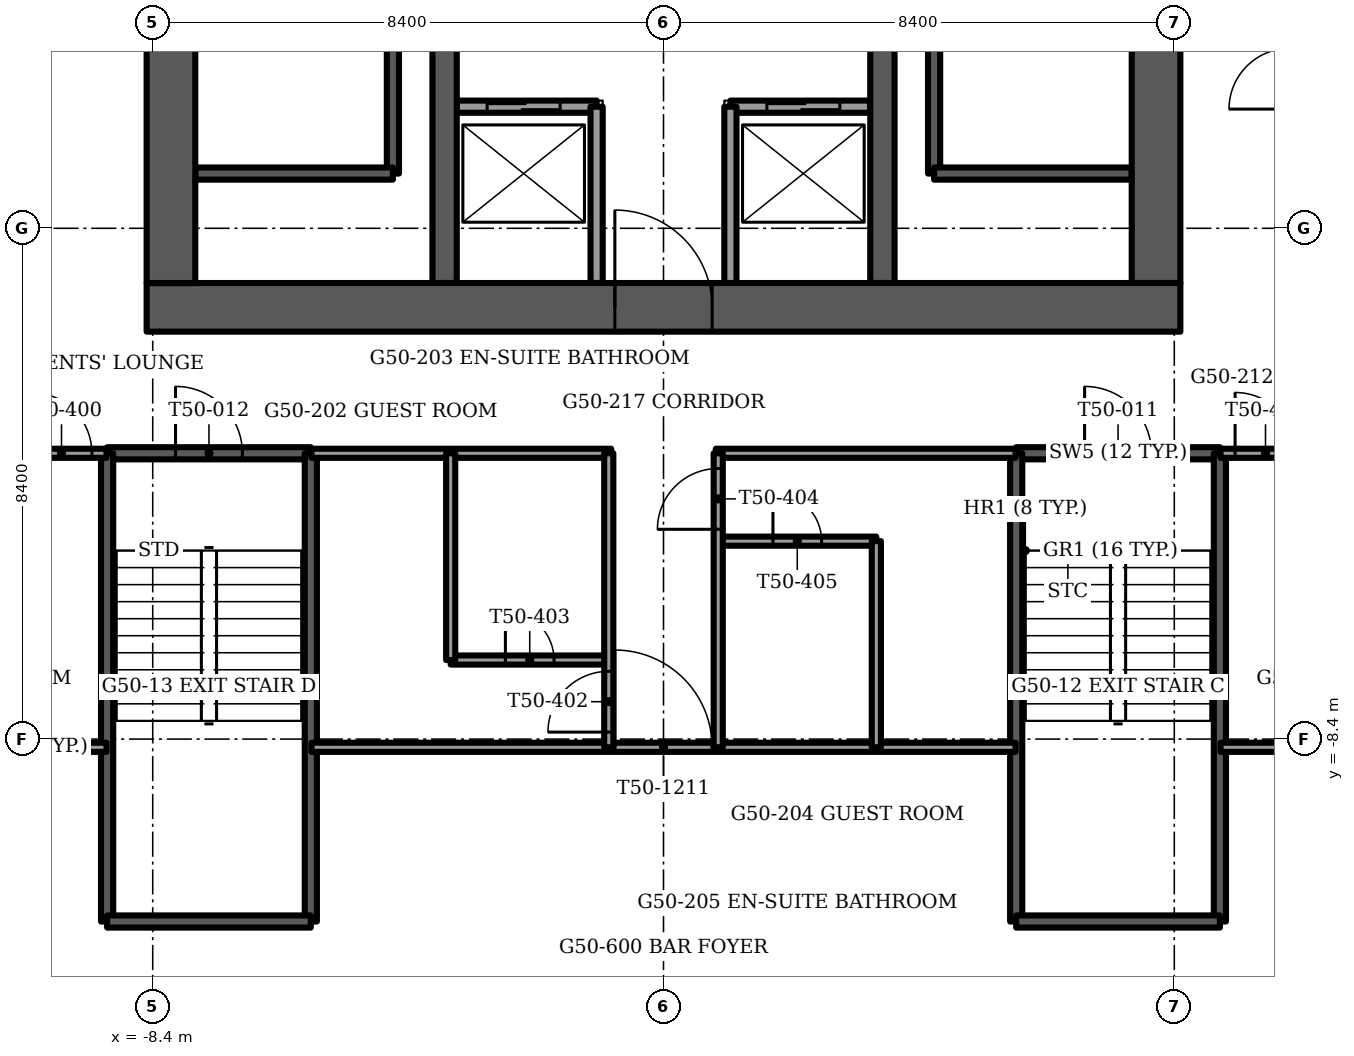
"""IFC4 building model, lengths in metres.
Left out: names, types, materials, properties, quantities, classifications, styles, units other than length and angle.
Written with IfcOpenShell. Run it as: python <this file> out.ifc"""

import sys

from ifc_helpers import new_model, si_unit, direction, frame, frame_2d, origin, place, context, subcontext, project, spatial, rectangle, extrude, element, fill, save


model = new_model("IFC4")
c1 = context("Model", 3, precision=1e-05, world=origin(), true_north=direction((0.0, 1.0)))
c2 = subcontext(c1, "Body", "Model", "MODEL_VIEW")
j1 = project(units=[si_unit("LENGTHUNIT", "METRE"), si_unit("PLANEANGLEUNIT", "RADIAN")], contexts=[c1])
p1 = place(None, origin())
s1 = spatial("IfcSite", under=j1, at=p1, CompositionType="ELEMENT")
p2 = place(p1, origin())
s2 = spatial("IfcBuilding", under=s1, at=p2, CompositionType="ELEMENT")
p3 = place(p2, frame((0.0, 0.0, 202.0)))
s3 = spatial("IfcBuildingStorey", under=s2, at=p3, CompositionType="ELEMENT", Elevation=202.0)
p4 = place(p3, frame((-8.5, -1.3, -0.3), z_axis=(0.0, 0.0, 1.0), x_axis=(1.0, 0.0, 0.0)))
e1 = element("IfcWall", 1, at=p4, inside=s3, PredefinedType="SHEAR", context=c2, shape_type="SweptSolid", body=[
    extrude(rectangle(XDim=17.0, YDim=0.8, at=frame_2d((8.5, 0.0))), origin(), (0.0, 0.0, 1.0), 3.75),
])
p5 = place(p4, frame((7.7, 0.0, 0.0)))
e2 = element("IfcOpeningElement", 2, at=p5, cuts=e1, PredefinedType="OPENING", context=c2, shape_type="SweptSolid", body=[
    extrude(rectangle(XDim=1.6, YDim=2.1, at=frame_2d((0.8, 1.05))), frame((0.0, 0.4, 0.0), z_axis=(0.0, -1.0, 0.0), x_axis=(1.0, 0.0, 0.0)), (0.0, 0.0, 1.0), 0.8),
])
p6 = place(p3, frame((-8.1, -0.9, -0.3), z_axis=(0.0, 0.0, 1.0), x_axis=(0.0, 1.0, 0.0)))
e3 = element("IfcWall", 3, at=p6, inside=s3, PredefinedType="SHEAR", context=c2, shape_type="SweptSolid", body=[
    extrude(rectangle(XDim=9.8, YDim=0.8, at=frame_2d((4.9, 0.0))), origin(), (0.0, 0.0, 1.0), 3.75),
])
p7 = place(p6, frame((8.15, 0.0, 0.0)))
e4 = element("IfcOpeningElement", 4, at=p7, cuts=e3, PredefinedType="OPENING", context=c2, shape_type="SweptSolid", body=[
    extrude(rectangle(XDim=1.1, YDim=2.1, at=frame_2d((0.55, 1.05))), frame((0.0, 0.4, 0.0), z_axis=(0.0, -1.0, 0.0), x_axis=(1.0, 0.0, 0.0)), (0.0, 0.0, 1.0), 0.8),
])
p8 = place(p3, frame((8.1, -0.9, -0.3), z_axis=(0.0, 0.0, 1.0), x_axis=(0.0, 1.0, 0.0)))
e5 = element("IfcWall", 5, at=p8, inside=s3, PredefinedType="SHEAR", context=c2, shape_type="SweptSolid", body=[
    extrude(rectangle(XDim=9.8, YDim=0.8, at=frame_2d((4.9, 0.0))), origin(), (0.0, 0.0, 1.0), 3.75),
])
p9 = place(p8, frame((8.15, 0.0, 0.0)))
e6 = element("IfcOpeningElement", 6, at=p9, cuts=e5, PredefinedType="OPENING", context=c2, shape_type="SweptSolid", body=[
    extrude(rectangle(XDim=1.1, YDim=2.1, at=frame_2d((0.55, 1.05))), frame((0.0, 0.4, 0.0), z_axis=(0.0, -1.0, 0.0), x_axis=(1.0, 0.0, 0.0)), (0.0, 0.0, 1.0), 0.8),
])
for number, where, z_axis, x_axis in (
    (7, (-3.6, -0.9, -0.3), (0.0, 0.0, 1.0), (0.0, 1.0, 0.0)),
    (8, (3.6, -0.9, -0.3), (0.0, 0.0, 1.0), (0.0, 1.0, 0.0)),
):
    element("IfcWall", number, at=place(p3, frame(where, z_axis=z_axis, x_axis=x_axis)), inside=s3, PredefinedType="SHEAR", context=c2, shape_type="SweptSolid", body=[
        extrude(rectangle(XDim=9.8, YDim=0.4, at=frame_2d((4.9, 0.0))), origin(), (0.0, 0.0, 1.0), 3.75),
    ])
p10 = place(p3, frame((-3.4, 2.0, 0.0), z_axis=(0.0, 0.0, 1.0), x_axis=(1.0, 0.0, 0.0)))
e9 = element("IfcWall", 9, at=p10, inside=s3, PredefinedType="PARTITIONING", context=c2, shape_type="SweptSolid", body=[
    extrude(rectangle(XDim=2.3, YDim=0.2, at=frame_2d((1.15, 0.0))), origin(), (0.0, 0.0, 1.0), 3.45),
])
p11 = place(p10, frame((0.5, 0.0, 0.0)))
e10 = element("IfcOpeningElement", 10, at=p11, cuts=e9, PredefinedType="OPENING", context=c2, shape_type="SweptSolid", body=[
    extrude(rectangle(XDim=1.2, YDim=2.1, at=frame_2d((0.6, 1.05))), frame((0.0, 0.1, 0.0), z_axis=(0.0, -1.0, 0.0), x_axis=(1.0, 0.0, 0.0)), (0.0, 0.0, 1.0), 0.2),
])
p12 = place(p3, frame((1.1, 2.0, 0.0), z_axis=(0.0, 0.0, 1.0), x_axis=(1.0, 0.0, 0.0)))
e11 = element("IfcWall", 11, at=p12, inside=s3, PredefinedType="PARTITIONING", context=c2, shape_type="SweptSolid", body=[
    extrude(rectangle(XDim=2.3, YDim=0.2, at=frame_2d((1.15, 0.0))), origin(), (0.0, 0.0, 1.0), 3.45),
])
p13 = place(p12, frame((0.6, 0.0, 0.0)))
e12 = element("IfcOpeningElement", 12, at=p13, cuts=e11, PredefinedType="OPENING", context=c2, shape_type="SweptSolid", body=[
    extrude(rectangle(XDim=1.2, YDim=2.1, at=frame_2d((0.6, 1.05))), frame((0.0, 0.1, 0.0), z_axis=(0.0, -1.0, 0.0), x_axis=(1.0, 0.0, 0.0)), (0.0, 0.0, 1.0), 0.2),
])
for number, where, z_axis, x_axis in (
    (13, (-1.1, -0.9, 0.0), (0.0, 0.0, 1.0), (0.0, 1.0, 0.0)),
    (14, (1.1, -0.9, 0.0), (0.0, 0.0, 1.0), (0.0, 1.0, 0.0)),
):
    element("IfcWall", number, at=place(p3, frame(where, z_axis=z_axis, x_axis=x_axis)), inside=s3, PredefinedType="PARTITIONING", context=c2, shape_type="SweptSolid", body=[
        extrude(rectangle(XDim=2.9, YDim=0.2, at=frame_2d((1.45, 0.0))), origin(), (0.0, 0.0, 1.0), 3.45),
    ])
p14 = place(p3, frame((-4.45, 0.9, -0.3), z_axis=(0.0, 0.0, 1.0), x_axis=(0.0, 1.0, 0.0)))
e15 = element("IfcWall", 15, at=p14, inside=s3, PredefinedType="SOLIDWALL", context=c2, shape_type="SweptSolid", body=[
    extrude(rectangle(XDim=8.0, YDim=0.2, at=frame_2d((4.0, 0.0))), origin(), (0.0, 0.0, 1.0), 3.75),
])
p15 = place(p3, frame((-7.7, 0.9, -0.3), z_axis=(0.0, 0.0, 1.0), x_axis=(1.0, 0.0, 0.0)))
e16 = element("IfcWall", 16, at=p15, inside=s3, PredefinedType="SOLIDWALL", context=c2, shape_type="SweptSolid", body=[
    extrude(rectangle(XDim=3.25, YDim=0.2, at=frame_2d((1.625, 0.0))), origin(), (0.0, 0.0, 1.0), 3.75),
])
p16 = place(p3, frame((4.45, 0.9, -0.3), z_axis=(0.0, 0.0, 1.0), x_axis=(0.0, 1.0, 0.0)))
e17 = element("IfcWall", 17, at=p16, inside=s3, PredefinedType="SOLIDWALL", context=c2, shape_type="SweptSolid", body=[
    extrude(rectangle(XDim=8.0, YDim=0.2, at=frame_2d((4.0, 0.0))), origin(), (0.0, 0.0, 1.0), 3.75),
])
p17 = place(p3, frame((4.45, 0.9, -0.3), z_axis=(0.0, 0.0, 1.0), x_axis=(1.0, 0.0, 0.0)))
e18 = element("IfcWall", 18, at=p17, inside=s3, PredefinedType="SOLIDWALL", context=c2, shape_type="SweptSolid", body=[
    extrude(rectangle(XDim=3.25, YDim=0.2, at=frame_2d((1.625, 0.0))), origin(), (0.0, 0.0, 1.0), 3.75),
])
p18 = place(p3, frame((5.8, -3.7, -0.3), z_axis=(0.0, 0.0, 1.0), x_axis=(1.0, 0.0, 0.0)))
e19 = element("IfcWall", 19, at=p18, inside=s3, PredefinedType="SOLIDWALL", context=c2, shape_type="SweptSolid", body=[
    extrude(rectangle(XDim=3.35, YDim=0.2, at=frame_2d((1.675, 0.0))), origin(), (0.0, 0.0, 1.0), 3.75),
])
p19 = place(p18, frame((1.125, 0.0, 0.0)))
e20 = element("IfcOpeningElement", 20, at=p19, cuts=e19, PredefinedType="OPENING", context=c2, shape_type="SweptSolid", body=[
    extrude(rectangle(XDim=1.1, YDim=2.1, at=frame_2d((0.55, 1.05))), frame((0.0, 0.1, 0.0), z_axis=(0.0, -1.0, 0.0), x_axis=(1.0, 0.0, 0.0)), (0.0, 0.0, 1.0), 0.2),
])
for number, where, z_axis, x_axis in (
    (21, (5.8, -3.7, -0.3), (0.0, 0.0, 1.0), (0.0, -1.0, 0.0)),
    (22, (9.15, -3.7, -0.3), (0.0, 0.0, 1.0), (0.0, -1.0, 0.0)),
):
    element("IfcWall", number, at=place(p3, frame(where, z_axis=z_axis, x_axis=x_axis)), inside=s3, PredefinedType="SOLIDWALL", context=c2, shape_type="SweptSolid", body=[
        extrude(rectangle(XDim=7.7, YDim=0.2, at=frame_2d((3.85, 0.0))), origin(), (0.0, 0.0, 1.0), 3.75),
    ])
p20 = place(p3, frame((5.8, -11.4, -0.3), z_axis=(0.0, 0.0, 1.0), x_axis=(1.0, 0.0, 0.0)))
e23 = element("IfcWall", 23, at=p20, inside=s3, PredefinedType="SOLIDWALL", context=c2, shape_type="SweptSolid", body=[
    extrude(rectangle(XDim=3.35, YDim=0.2, at=frame_2d((1.675, 0.0))), origin(), (0.0, 0.0, 1.0), 3.75),
])
p21 = place(p3, frame((-9.15, -3.7, -0.3), z_axis=(0.0, 0.0, 1.0), x_axis=(1.0, 0.0, 0.0)))
e24 = element("IfcWall", 24, at=p21, inside=s3, PredefinedType="SOLIDWALL", context=c2, shape_type="SweptSolid", body=[
    extrude(rectangle(XDim=3.35, YDim=0.2, at=frame_2d((1.675, 0.0))), origin(), (0.0, 0.0, 1.0), 3.75),
])
p22 = place(p21, frame((1.125, 0.0, 0.0)))
e25 = element("IfcOpeningElement", 25, at=p22, cuts=e24, PredefinedType="OPENING", context=c2, shape_type="SweptSolid", body=[
    extrude(rectangle(XDim=1.1, YDim=2.1, at=frame_2d((0.55, 1.05))), frame((0.0, 0.1, 0.0), z_axis=(0.0, -1.0, 0.0), x_axis=(1.0, 0.0, 0.0)), (0.0, 0.0, 1.0), 0.2),
])
for number, where, z_axis, x_axis in (
    (26, (-9.15, -3.7, -0.3), (0.0, 0.0, 1.0), (0.0, -1.0, 0.0)),
    (27, (-5.8, -3.7, -0.3), (0.0, 0.0, 1.0), (0.0, -1.0, 0.0)),
):
    element("IfcWall", number, at=place(p3, frame(where, z_axis=z_axis, x_axis=x_axis)), inside=s3, PredefinedType="SOLIDWALL", context=c2, shape_type="SweptSolid", body=[
        extrude(rectangle(XDim=7.7, YDim=0.2, at=frame_2d((3.85, 0.0))), origin(), (0.0, 0.0, 1.0), 3.75),
    ])
p23 = place(p3, frame((-9.15, -11.4, -0.3), z_axis=(0.0, 0.0, 1.0), x_axis=(1.0, 0.0, 0.0)))
e28 = element("IfcWall", 28, at=p23, inside=s3, PredefinedType="SOLIDWALL", context=c2, shape_type="SweptSolid", body=[
    extrude(rectangle(XDim=3.35, YDim=0.2, at=frame_2d((1.675, 0.0))), origin(), (0.0, 0.0, 1.0), 3.75),
])
p24 = place(p3, frame((-11.93, -8.535, 0.0), z_axis=(0.0, 0.0, 1.0), x_axis=(1.0, 0.0, 0.0)))
e29 = element("IfcWall", 29, at=p24, inside=s3, PredefinedType="PARTITIONING", context=c2, shape_type="SweptSolid", body=[
    extrude(rectangle(XDim=2.77, YDim=0.15, at=frame_2d((1.385, 0.0))), origin(), (0.0, 0.0, 1.0), 3.45),
])
p25 = place(p3, frame((-5.79, -8.535, 0.0), z_axis=(0.0, 0.0, 1.0), x_axis=(1.0, 0.0, 0.0)))
e30 = element("IfcWall", 30, at=p25, inside=s3, PredefinedType="PARTITIONING", context=c2, shape_type="SweptSolid", body=[
    extrude(rectangle(XDim=11.58, YDim=0.15, at=frame_2d((5.79, 0.0))), origin(), (0.0, 0.0, 1.0), 3.45),
])
p26 = place(p25, frame((4.99, 0.0, 0.0)))
e31 = element("IfcOpeningElement", 31, at=p26, cuts=e30, PredefinedType="OPENING", context=c2, shape_type="SweptSolid", body=[
    extrude(rectangle(XDim=1.6, YDim=2.1, at=frame_2d((0.8, 1.05))), frame((0.0, 0.075, 0.0), z_axis=(0.0, -1.0, 0.0), x_axis=(1.0, 0.0, 0.0)), (0.0, 0.0, 1.0), 0.15),
])
p27 = place(p3, frame((9.16, -8.535, 0.0), z_axis=(0.0, 0.0, 1.0), x_axis=(1.0, 0.0, 0.0)))
e32 = element("IfcWall", 32, at=p27, inside=s3, PredefinedType="PARTITIONING", context=c2, shape_type="SweptSolid", body=[
    extrude(rectangle(XDim=2.77, YDim=0.15, at=frame_2d((1.385, 0.0))), origin(), (0.0, 0.0, 1.0), 3.45),
])
p28 = place(p3, frame((-3.5, -7.1, 0.0), z_axis=(0.0, 0.0, 1.0), x_axis=(1.0, 0.0, 0.0)))
e33 = element("IfcWall", 33, at=p28, inside=s3, PredefinedType="PARTITIONING", context=c2, shape_type="SweptSolid", body=[
    extrude(rectangle(XDim=2.6, YDim=0.15, at=frame_2d((1.3, 0.0))), origin(), (0.0, 0.0, 1.0), 3.45),
])
p29 = place(p28, frame((0.9, 0.0, 0.0)))
e34 = element("IfcOpeningElement", 34, at=p29, cuts=e33, PredefinedType="OPENING", context=c2, shape_type="SweptSolid", body=[
    extrude(rectangle(XDim=0.8, YDim=2.1, at=frame_2d((0.4, 1.05))), frame((0.0, 0.075, 0.0), z_axis=(0.0, -1.0, 0.0), x_axis=(1.0, 0.0, 0.0)), (0.0, 0.0, 1.0), 0.15),
])
p30 = place(p3, frame((0.9, -5.145, 0.0), z_axis=(0.0, 0.0, 1.0), x_axis=(1.0, 0.0, 0.0)))
e35 = element("IfcWall", 35, at=p30, inside=s3, PredefinedType="PARTITIONING", context=c2, shape_type="SweptSolid", body=[
    extrude(rectangle(XDim=2.6, YDim=0.15, at=frame_2d((1.3, 0.0))), origin(), (0.0, 0.0, 1.0), 3.45),
])
p31 = place(p30, frame((0.9, 0.0, 0.0)))
e36 = element("IfcOpeningElement", 36, at=p31, cuts=e35, PredefinedType="OPENING", context=c2, shape_type="SweptSolid", body=[
    extrude(rectangle(XDim=0.8, YDim=2.1, at=frame_2d((0.4, 1.05))), frame((0.0, 0.075, 0.0), z_axis=(0.0, -1.0, 0.0), x_axis=(1.0, 0.0, 0.0)), (0.0, 0.0, 1.0), 0.15),
])
p32 = place(p3, frame((-15.727, -3.7, 0.0), z_axis=(0.0, 0.0, 1.0), x_axis=(1.0, 0.0, 0.0)))
e37 = element("IfcWall", 37, at=p32, inside=s3, PredefinedType="PARTITIONING", context=c2, shape_type="SweptSolid", body=[
    extrude(rectangle(XDim=6.567, YDim=0.15, at=frame_2d((3.284, 0.0))), origin(), (0.0, 0.0, 1.0), 3.45),
])
p33 = place(p32, frame((5.327, 0.0, 0.0)))
e38 = element("IfcOpeningElement", 38, at=p33, cuts=e37, PredefinedType="OPENING", context=c2, shape_type="SweptSolid", body=[
    extrude(rectangle(XDim=1.0, YDim=2.1, at=frame_2d((0.5, 1.05))), frame((0.0, 0.075, 0.0), z_axis=(0.0, -1.0, 0.0), x_axis=(1.0, 0.0, 0.0)), (0.0, 0.0, 1.0), 0.15),
])
for number, where, z_axis, x_axis in (
    (39, (-5.79, -3.7, 0.0), (0.0, 0.0, 1.0), (1.0, 0.0, 0.0)),
    (40, (0.86, -3.7, 0.0), (0.0, 0.0, 1.0), (1.0, 0.0, 0.0)),
):
    element("IfcWall", number, at=place(p3, frame(where, z_axis=z_axis, x_axis=x_axis)), inside=s3, PredefinedType="PARTITIONING", context=c2, shape_type="SweptSolid", body=[
        extrude(rectangle(XDim=4.93, YDim=0.15, at=frame_2d((2.465, 0.0))), origin(), (0.0, 0.0, 1.0), 3.45),
    ])
p34 = place(p3, frame((9.16, -3.7, 0.0), z_axis=(0.0, 0.0, 1.0), x_axis=(1.0, 0.0, 0.0)))
e41 = element("IfcWall", 41, at=p34, inside=s3, PredefinedType="PARTITIONING", context=c2, shape_type="SweptSolid", body=[
    extrude(rectangle(XDim=6.567, YDim=0.15, at=frame_2d((3.284, 0.0))), origin(), (0.0, 0.0, 1.0), 3.45),
])
p35 = place(p34, frame((0.24, 0.0, 0.0)))
e42 = element("IfcOpeningElement", 42, at=p35, cuts=e41, PredefinedType="OPENING", context=c2, shape_type="SweptSolid", body=[
    extrude(rectangle(XDim=1.0, YDim=2.1, at=frame_2d((0.5, 1.05))), frame((0.0, 0.075, 0.0), z_axis=(0.0, -1.0, 0.0), x_axis=(1.0, 0.0, 0.0)), (0.0, 0.0, 1.0), 0.15),
])
p36 = place(p3, frame((3.5, -8.535, 0.0), z_axis=(0.0, 0.0, 1.0), x_axis=(0.0, 1.0, 0.0)))
e43 = element("IfcWall", 43, at=p36, inside=s3, PredefinedType="PARTITIONING", context=c2, shape_type="SweptSolid", body=[
    extrude(rectangle(XDim=3.39, YDim=0.15, at=frame_2d((1.695, 0.0))), origin(), (0.0, 0.0, 1.0), 3.45),
])
p37 = place(p3, frame((0.9, -8.535, 0.0), z_axis=(0.0, 0.0, 1.0), x_axis=(0.0, 1.0, 0.0)))
e44 = element("IfcWall", 44, at=p37, inside=s3, PredefinedType="PARTITIONING", context=c2, shape_type="SweptSolid", body=[
    extrude(rectangle(XDim=4.835, YDim=0.15, at=frame_2d((2.417, 0.0))), origin(), (0.0, 0.0, 1.0), 3.45),
])
p38 = place(p37, frame((3.585, 0.0, 0.0)))
e45 = element("IfcOpeningElement", 45, at=p38, cuts=e44, PredefinedType="OPENING", context=c2, shape_type="SweptSolid", body=[
    extrude(rectangle(XDim=1.0, YDim=2.1, at=frame_2d((0.5, 1.05))), frame((0.0, 0.075, 0.0), z_axis=(0.0, -1.0, 0.0), x_axis=(1.0, 0.0, 0.0)), (0.0, 0.0, 1.0), 0.15),
])
p39 = place(p3, frame((-0.9, -8.535, 0.0), z_axis=(0.0, 0.0, 1.0), x_axis=(0.0, 1.0, 0.0)))
e46 = element("IfcWall", 46, at=p39, inside=s3, PredefinedType="PARTITIONING", context=c2, shape_type="SweptSolid", body=[
    extrude(rectangle(XDim=4.835, YDim=0.15, at=frame_2d((2.417, 0.0))), origin(), (0.0, 0.0, 1.0), 3.45),
])
p40 = place(p39, frame((0.25, 0.0, 0.0)))
e47 = element("IfcOpeningElement", 47, at=p40, cuts=e46, PredefinedType="OPENING", context=c2, shape_type="SweptSolid", body=[
    extrude(rectangle(XDim=1.0, YDim=2.1, at=frame_2d((0.5, 1.05))), frame((0.0, 0.075, 0.0), z_axis=(0.0, -1.0, 0.0), x_axis=(1.0, 0.0, 0.0)), (0.0, 0.0, 1.0), 0.15),
])
p41 = place(p3, frame((-3.5, -7.1, 0.0), z_axis=(0.0, 0.0, 1.0), x_axis=(0.0, 1.0, 0.0)))
e48 = element("IfcWall", 48, at=p41, inside=s3, PredefinedType="PARTITIONING", context=c2, shape_type="SweptSolid", body=[
    extrude(rectangle(XDim=3.4, YDim=0.15, at=frame_2d((1.7, 0.0))), origin(), (0.0, 0.0, 1.0), 3.45),
])
p42 = place(p11, origin())
e49 = element("IfcDoor", 49, at=p42, inside=s3, OperationType="SLIDING_TO_LEFT", PredefinedType="DOOR", context=c2, shape_type="SweptSolid", body=[
    extrude(rectangle(XDim=1.2, YDim=2.1, at=frame_2d((0.6, 1.05))), frame((0.0, 0.025, 0.0), z_axis=(0.0, -1.0, 0.0), x_axis=(1.0, 0.0, 0.0)), (0.0, 0.0, 1.0), 0.05),
])
fill(e10, e49)
p43 = place(p13, origin())
e50 = element("IfcDoor", 50, at=p43, inside=s3, OperationType="SLIDING_TO_LEFT", PredefinedType="DOOR", context=c2, shape_type="SweptSolid", body=[
    extrude(rectangle(XDim=1.2, YDim=2.1, at=frame_2d((0.6, 1.05))), frame((0.0, 0.025, 0.0), z_axis=(0.0, -1.0, 0.0), x_axis=(1.0, 0.0, 0.0)), (0.0, 0.0, 1.0), 0.05),
])
fill(e12, e50)
p44 = place(p5, origin())
e51 = element("IfcDoor", 51, at=p44, inside=s3, OperationType="DOUBLE_DOOR_SINGLE_SWING", PredefinedType="DOOR", context=c2, shape_type="SweptSolid", body=[
    extrude(rectangle(XDim=1.6, YDim=2.1, at=frame_2d((0.8, 1.05))), frame((0.0, 0.025, 0.0), z_axis=(0.0, -1.0, 0.0), x_axis=(1.0, 0.0, 0.0)), (0.0, 0.0, 1.0), 0.05),
])
fill(e2, e51)
p45 = place(p19, origin())
e52 = element("IfcDoor", 52, at=p45, inside=s3, OperationType="SINGLE_SWING_LEFT", PredefinedType="DOOR", context=c2, shape_type="SweptSolid", body=[
    extrude(rectangle(XDim=1.1, YDim=2.1, at=frame_2d((0.55, 1.05))), frame((0.0, 0.025, 0.0), z_axis=(0.0, -1.0, 0.0), x_axis=(1.0, 0.0, 0.0)), (0.0, 0.0, 1.0), 0.05),
])
fill(e20, e52)
p46 = place(p22, origin())
e53 = element("IfcDoor", 53, at=p46, inside=s3, OperationType="SINGLE_SWING_LEFT", PredefinedType="DOOR", context=c2, shape_type="SweptSolid", body=[
    extrude(rectangle(XDim=1.1, YDim=2.1, at=frame_2d((0.55, 1.05))), frame((0.0, 0.025, 0.0), z_axis=(0.0, -1.0, 0.0), x_axis=(1.0, 0.0, 0.0)), (0.0, 0.0, 1.0), 0.05),
])
fill(e25, e53)
p47 = place(p33, origin())
e54 = element("IfcDoor", 54, at=p47, inside=s3, OperationType="SINGLE_SWING_RIGHT", PredefinedType="DOOR", context=c2, shape_type="SweptSolid", body=[
    extrude(rectangle(XDim=1.0, YDim=2.1, at=frame_2d((0.5, 1.05))), frame((0.0, 0.025, 0.0), z_axis=(0.0, -1.0, 0.0), x_axis=(1.0, 0.0, 0.0)), (0.0, 0.0, 1.0), 0.05),
])
fill(e38, e54)
p48 = place(p40, origin())
e55 = element("IfcDoor", 55, at=p48, inside=s3, OperationType="SINGLE_SWING_LEFT", PredefinedType="DOOR", context=c2, shape_type="SweptSolid", body=[
    extrude(rectangle(XDim=1.0, YDim=2.1, at=frame_2d((0.5, 1.05))), frame((0.0, 0.025, 0.0), z_axis=(0.0, -1.0, 0.0), x_axis=(1.0, 0.0, 0.0)), (0.0, 0.0, 1.0), 0.05),
])
fill(e47, e55)
p49 = place(p29, origin())
e56 = element("IfcDoor", 56, at=p49, inside=s3, OperationType="SINGLE_SWING_RIGHT", PredefinedType="DOOR", context=c2, shape_type="SweptSolid", body=[
    extrude(rectangle(XDim=0.8, YDim=2.1, at=frame_2d((0.4, 1.05))), frame((0.0, 0.025, 0.0), z_axis=(0.0, -1.0, 0.0), x_axis=(1.0, 0.0, 0.0)), (0.0, 0.0, 1.0), 0.05),
])
fill(e34, e56)
p50 = place(p38, origin())
e57 = element("IfcDoor", 57, at=p50, inside=s3, OperationType="SINGLE_SWING_RIGHT", PredefinedType="DOOR", context=c2, shape_type="SweptSolid", body=[
    extrude(rectangle(XDim=1.0, YDim=2.1, at=frame_2d((0.5, 1.05))), frame((0.0, 0.025, 0.0), z_axis=(0.0, -1.0, 0.0), x_axis=(1.0, 0.0, 0.0)), (0.0, 0.0, 1.0), 0.05),
])
fill(e45, e57)
p51 = place(p31, origin())
e58 = element("IfcDoor", 58, at=p51, inside=s3, OperationType="SINGLE_SWING_LEFT", PredefinedType="DOOR", context=c2, shape_type="SweptSolid", body=[
    extrude(rectangle(XDim=0.8, YDim=2.1, at=frame_2d((0.4, 1.05))), frame((0.0, 0.025, 0.0), z_axis=(0.0, -1.0, 0.0), x_axis=(1.0, 0.0, 0.0)), (0.0, 0.0, 1.0), 0.05),
])
fill(e36, e58)
p52 = place(p35, origin())
e59 = element("IfcDoor", 59, at=p52, inside=s3, OperationType="SINGLE_SWING_LEFT", PredefinedType="DOOR", context=c2, shape_type="SweptSolid", body=[
    extrude(rectangle(XDim=1.0, YDim=2.1, at=frame_2d((0.5, 1.05))), frame((0.0, 0.025, 0.0), z_axis=(0.0, -1.0, 0.0), x_axis=(1.0, 0.0, 0.0)), (0.0, 0.0, 1.0), 0.05),
])
fill(e42, e59)
p53 = place(p26, origin())
e60 = element("IfcDoor", 60, at=p53, inside=s3, OperationType="DOUBLE_DOOR_SINGLE_SWING", PredefinedType="DOOR", context=c2, shape_type="SweptSolid", body=[
    extrude(rectangle(XDim=1.6, YDim=2.1, at=frame_2d((0.8, 1.05))), frame((0.0, 0.025, 0.0), z_axis=(0.0, -1.0, 0.0), x_axis=(1.0, 0.0, 0.0)), (0.0, 0.0, 1.0), 0.05),
])
fill(e31, e60)
save(model, sys.argv[1])
